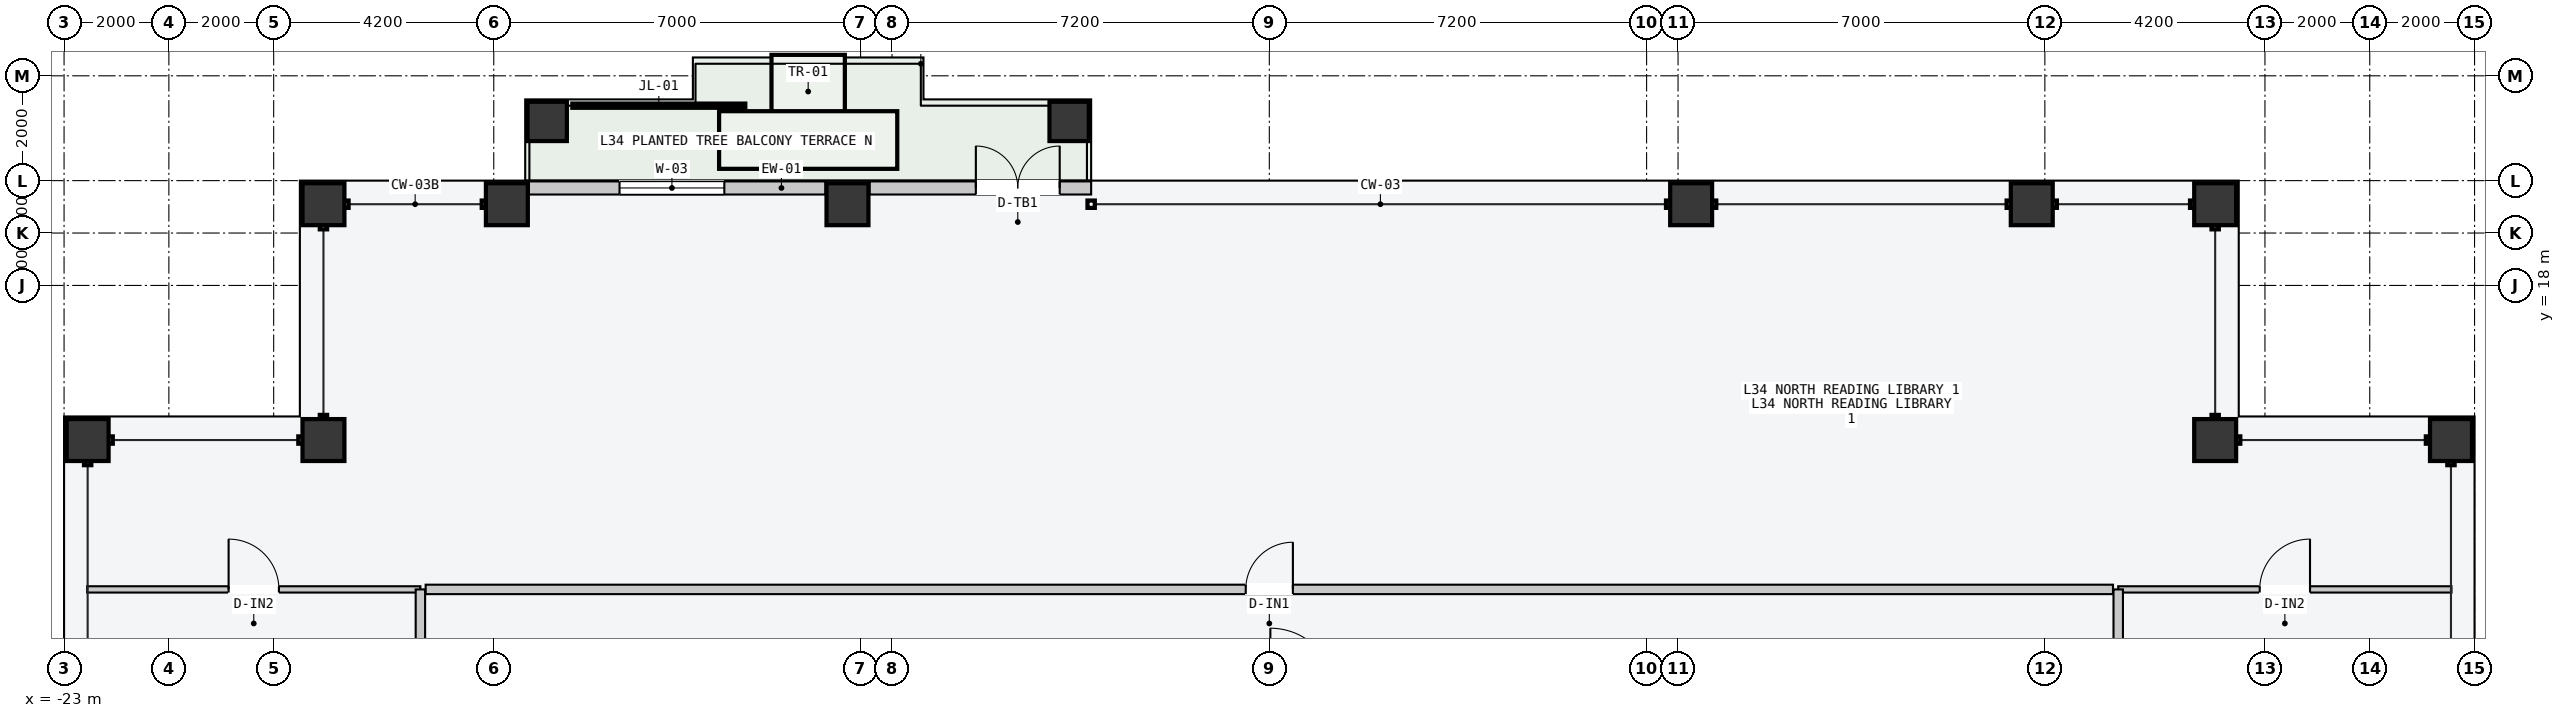
"""IFC4 building model, lengths in metres.
Left out: names, types, materials, properties, quantities, classifications, styles, units other than length and angle.
Written with IfcOpenShell. Run it as: python <this file> out.ifc"""

import sys

from ifc_helpers import new_model, si_unit, direction, frame, frame_2d, origin, origin_2d, place, context, subcontext, project, spatial, rectangle, hollow_rectangle, extrude, element, fill, save


model = new_model("IFC4")
c1 = context("Model", 3, precision=1e-05, world=origin(), true_north=direction((0.0, 1.0)))
c2 = subcontext(c1, "Body", "Model", "MODEL_VIEW")
j1 = project(units=[si_unit("LENGTHUNIT", "METRE"), si_unit("PLANEANGLEUNIT", "RADIAN")], contexts=[c1])
p1 = place(None, origin())
s1 = spatial("IfcSite", under=j1, at=p1, CompositionType="ELEMENT")
p2 = place(p1, origin())
s2 = spatial("IfcBuilding", under=s1, at=p2, CompositionType="ELEMENT")
p3 = place(p2, frame((0.0, 0.0, 131.4)))
s3 = spatial("IfcBuildingStorey", under=s2, at=p3, CompositionType="ELEMENT", Elevation=131.4)
for number, where, z_axis, x_axis in (
    (1, (-18.05, 19.55, 0.0), (0.0, 0.0, 1.0), (1.0, 0.0, 0.0)),
    (2, (-14.55, 19.55, 0.0), (0.0, 0.0, 1.0), (1.0, 0.0, 0.0)),
    (3, (-8.05, 19.55, 0.0), (0.0, 0.0, 1.0), (1.0, 0.0, 0.0)),
    (4, (8.05, 19.55, 0.0), (0.0, 0.0, 1.0), (1.0, 0.0, 0.0)),
    (5, (14.55, 19.55, 0.0), (0.0, 0.0, 1.0), (1.0, 0.0, 0.0)),
    (6, (18.05, 19.55, 0.0), (0.0, 0.0, 1.0), (1.0, 0.0, 0.0)),
    (7, (-22.55, 15.05, 0.0), (0.0, 0.0, 1.0), (0.0, 1.0, 0.0)),
    (8, (22.55, 15.05, 0.0), (0.0, 0.0, 1.0), (0.0, 1.0, 0.0)),
    (9, (-18.05, 15.05, 0.0), (0.0, 0.0, 1.0), (1.0, 0.0, 0.0)),
    (10, (18.05, 15.05, 0.0), (0.0, 0.0, 1.0), (1.0, 0.0, 0.0)),
):
    element("IfcColumn", number, at=place(p3, frame(where, z_axis=z_axis, x_axis=x_axis)), inside=s3, PredefinedType="COLUMN", context=c2, shape_type="SweptSolid", body=[
        extrude(hollow_rectangle(XDim=0.8, YDim=0.8, WallThickness=0.036, at=origin_2d()), origin(), (0.0, 0.0, 1.0), 3.6),
    ])
for number, where, z_axis, x_axis in (
    (11, (-13.78, 21.13, 0.0), (0.0, 0.0, 1.0), (1.0, 0.0, 0.0)),
    (12, (-3.82, 21.13, 0.0), (0.0, 0.0, 1.0), (1.0, 0.0, 0.0)),
):
    element("IfcColumn", number, at=place(p3, frame(where, z_axis=z_axis, x_axis=x_axis)), inside=s3, PredefinedType="COLUMN", context=c2, shape_type="SweptSolid", body=[
        extrude(hollow_rectangle(XDim=0.75, YDim=0.75, WallThickness=0.032, at=origin_2d()), origin(), (0.0, 0.0, 1.0), 3.6),
    ])
p4 = place(p3, frame((-14.13, 19.86, 0.0), z_axis=(0.0, 0.0, 1.0), x_axis=(1.0, 0.0, 0.0)))
e13 = element("IfcWall", 13, at=p4, inside=s3, PredefinedType="STANDARD", context=c2, shape_type="SweptSolid", body=[
    extrude(rectangle(XDim=5.66, YDim=0.25, at=frame_2d((2.83, 0.0))), origin(), (0.0, 0.0, 1.0), 3.4),
])
p5 = place(p4, frame((1.73, 0.0, 0.85)))
e14 = element("IfcOpeningElement", 14, at=p5, cuts=e13, PredefinedType="OPENING", context=c2, shape_type="SweptSolid", body=[
    extrude(rectangle(XDim=2.0, YDim=2.1, at=frame_2d((1.0, 1.05))), frame((0.0, 0.135, 0.0), z_axis=(0.0, -1.0, 0.0), x_axis=(1.0, 0.0, 0.0)), (0.0, 0.0, 1.0), 0.27),
])
p6 = place(p3, frame((-7.63, 19.86, 0.0), z_axis=(0.0, 0.0, 1.0), x_axis=(1.0, 0.0, 0.0)))
e15 = element("IfcWall", 15, at=p6, inside=s3, PredefinedType="STANDARD", context=c2, shape_type="SweptSolid", body=[
    extrude(rectangle(XDim=4.23, YDim=0.25, at=frame_2d((2.115, 0.0))), origin(), (0.0, 0.0, 1.0), 3.4),
])
p7 = place(p6, frame((2.03, 0.0, 0.0)))
e16 = element("IfcOpeningElement", 16, at=p7, cuts=e15, PredefinedType="OPENING", context=c2, shape_type="SweptSolid", body=[
    extrude(rectangle(XDim=1.6, YDim=2.2, at=frame_2d((0.8, 1.1))), frame((0.0, 0.135, 0.0), z_axis=(0.0, -1.0, 0.0), x_axis=(1.0, 0.0, 0.0)), (0.0, 0.0, 1.0), 0.27),
])
p8 = place(p3, frame((-16.1, 12.2, 0.0), z_axis=(0.0, 0.0, 1.0), x_axis=(1.0, 0.0, 0.0)))
e17 = element("IfcWall", 17, at=p8, inside=s3, PredefinedType="PARTITIONING", context=c2, shape_type="SweptSolid", body=[
    extrude(rectangle(XDim=32.2, YDim=0.18, at=frame_2d((16.1, 0.0))), origin(), (0.0, 0.0, 1.0), 3.4),
])
p9 = place(p8, frame((15.65, 0.0, 0.0)))
e18 = element("IfcOpeningElement", 18, at=p9, cuts=e17, PredefinedType="OPENING", context=c2, shape_type="SweptSolid", body=[
    extrude(rectangle(XDim=0.9, YDim=2.15, at=frame_2d((0.45, 1.075))), frame((0.0, 0.1, 0.0), z_axis=(0.0, -1.0, 0.0), x_axis=(1.0, 0.0, 0.0)), (0.0, 0.0, 1.0), 0.2),
])
p10 = place(p3, frame((-22.56, 12.2, 0.0), z_axis=(0.0, 0.0, 1.0), x_axis=(1.0, 0.0, 0.0)))
e19 = element("IfcWall", 19, at=p10, inside=s3, PredefinedType="PARTITIONING", context=c2, shape_type="SweptSolid", body=[
    extrude(rectangle(XDim=6.36, YDim=0.12, at=frame_2d((3.18, 0.0))), origin(), (0.0, 0.0, 1.0), 3.4),
])
p11 = place(p10, frame((2.7, 0.0, 0.0)))
e20 = element("IfcOpeningElement", 20, at=p11, cuts=e19, PredefinedType="OPENING", context=c2, shape_type="SweptSolid", body=[
    extrude(rectangle(XDim=0.96, YDim=2.18, at=frame_2d((0.48, 1.09))), frame((0.0, 0.07, 0.0), z_axis=(0.0, -1.0, 0.0), x_axis=(1.0, 0.0, 0.0)), (0.0, 0.0, 1.0), 0.14),
])
p12 = place(p3, frame((16.2, 12.2, 0.0), z_axis=(0.0, 0.0, 1.0), x_axis=(1.0, 0.0, 0.0)))
e21 = element("IfcWall", 21, at=p12, inside=s3, PredefinedType="PARTITIONING", context=c2, shape_type="SweptSolid", body=[
    extrude(rectangle(XDim=6.36, YDim=0.12, at=frame_2d((3.18, 0.0))), origin(), (0.0, 0.0, 1.0), 3.4),
])
p13 = place(p12, frame((2.7, 0.0, 0.0)))
e22 = element("IfcOpeningElement", 22, at=p13, cuts=e21, PredefinedType="OPENING", context=c2, shape_type="SweptSolid", body=[
    extrude(rectangle(XDim=0.96, YDim=2.18, at=frame_2d((0.48, 1.09))), frame((0.0, 0.07, 0.0), z_axis=(0.0, -1.0, 0.0), x_axis=(1.0, 0.0, 0.0)), (0.0, 0.0, 1.0), 0.14),
])
for number, where, z_axis, x_axis in (
    (23, (-16.2, 10.25, 0.0), (0.0, 0.0, 1.0), (0.0, 1.0, 0.0)),
    (24, (16.2, 10.25, 0.0), (0.0, 0.0, 1.0), (0.0, 1.0, 0.0)),
):
    element("IfcWall", number, at=place(p3, frame(where, z_axis=z_axis, x_axis=x_axis)), inside=s3, PredefinedType="PARTITIONING", context=c2, shape_type="SweptSolid", body=[
        extrude(rectangle(XDim=1.95, YDim=0.18, at=frame_2d((0.975, 0.0))), origin(), (0.0, 0.0, 1.0), 3.4),
    ])
p14 = place(p5, origin())
e25 = element("IfcWindow", 25, at=p14, inside=s3, PartitioningType="SINGLE_PANEL", PredefinedType="WINDOW", context=c2, shape_type="SweptSolid", body=[
    extrude(rectangle(XDim=2.0, YDim=2.1, at=frame_2d((1.0, 1.05))), frame((0.0, 0.03, 0.0), z_axis=(0.0, -1.0, 0.0), x_axis=(1.0, 0.0, 0.0)), (0.0, 0.0, 1.0), 0.06),
])
fill(e14, e25)
p15 = place(p7, origin())
e26 = element("IfcDoor", 26, at=p15, inside=s3, OperationType="DOUBLE_DOOR_SINGLE_SWING", PredefinedType="DOOR", context=c2, shape_type="SweptSolid", body=[
    extrude(rectangle(XDim=1.6, YDim=2.2, at=frame_2d((0.8, 1.1))), frame((0.0, 0.025, 0.0), z_axis=(0.0, -1.0, 0.0), x_axis=(1.0, 0.0, 0.0)), (0.0, 0.0, 1.0), 0.05),
])
fill(e16, e26)
p16 = place(p9, origin())
e27 = element("IfcDoor", 27, at=p16, inside=s3, OperationType="SINGLE_SWING_RIGHT", PredefinedType="DOOR", context=c2, shape_type="SweptSolid", body=[
    extrude(rectangle(XDim=0.9, YDim=2.15, at=frame_2d((0.45, 1.075))), frame((0.0, 0.025, 0.0), z_axis=(0.0, -1.0, 0.0), x_axis=(1.0, 0.0, 0.0)), (0.0, 0.0, 1.0), 0.05),
])
fill(e18, e27)
p17 = place(p11, origin())
e28 = element("IfcDoor", 28, at=p17, inside=s3, OperationType="SINGLE_SWING_LEFT", PredefinedType="DOOR", context=c2, shape_type="SweptSolid", body=[
    extrude(rectangle(XDim=0.96, YDim=2.18, at=frame_2d((0.48, 1.09))), frame((0.0, 0.025, 0.0), z_axis=(0.0, -1.0, 0.0), x_axis=(1.0, 0.0, 0.0)), (0.0, 0.0, 1.0), 0.05),
])
fill(e20, e28)
p18 = place(p13, origin())
e29 = element("IfcDoor", 29, at=p18, inside=s3, OperationType="SINGLE_SWING_RIGHT", PredefinedType="DOOR", context=c2, shape_type="SweptSolid", body=[
    extrude(rectangle(XDim=0.96, YDim=2.18, at=frame_2d((0.48, 1.09))), frame((0.0, 0.025, 0.0), z_axis=(0.0, -1.0, 0.0), x_axis=(1.0, 0.0, 0.0)), (0.0, 0.0, 1.0), 0.05),
])
fill(e22, e29)
save(model, sys.argv[1])
